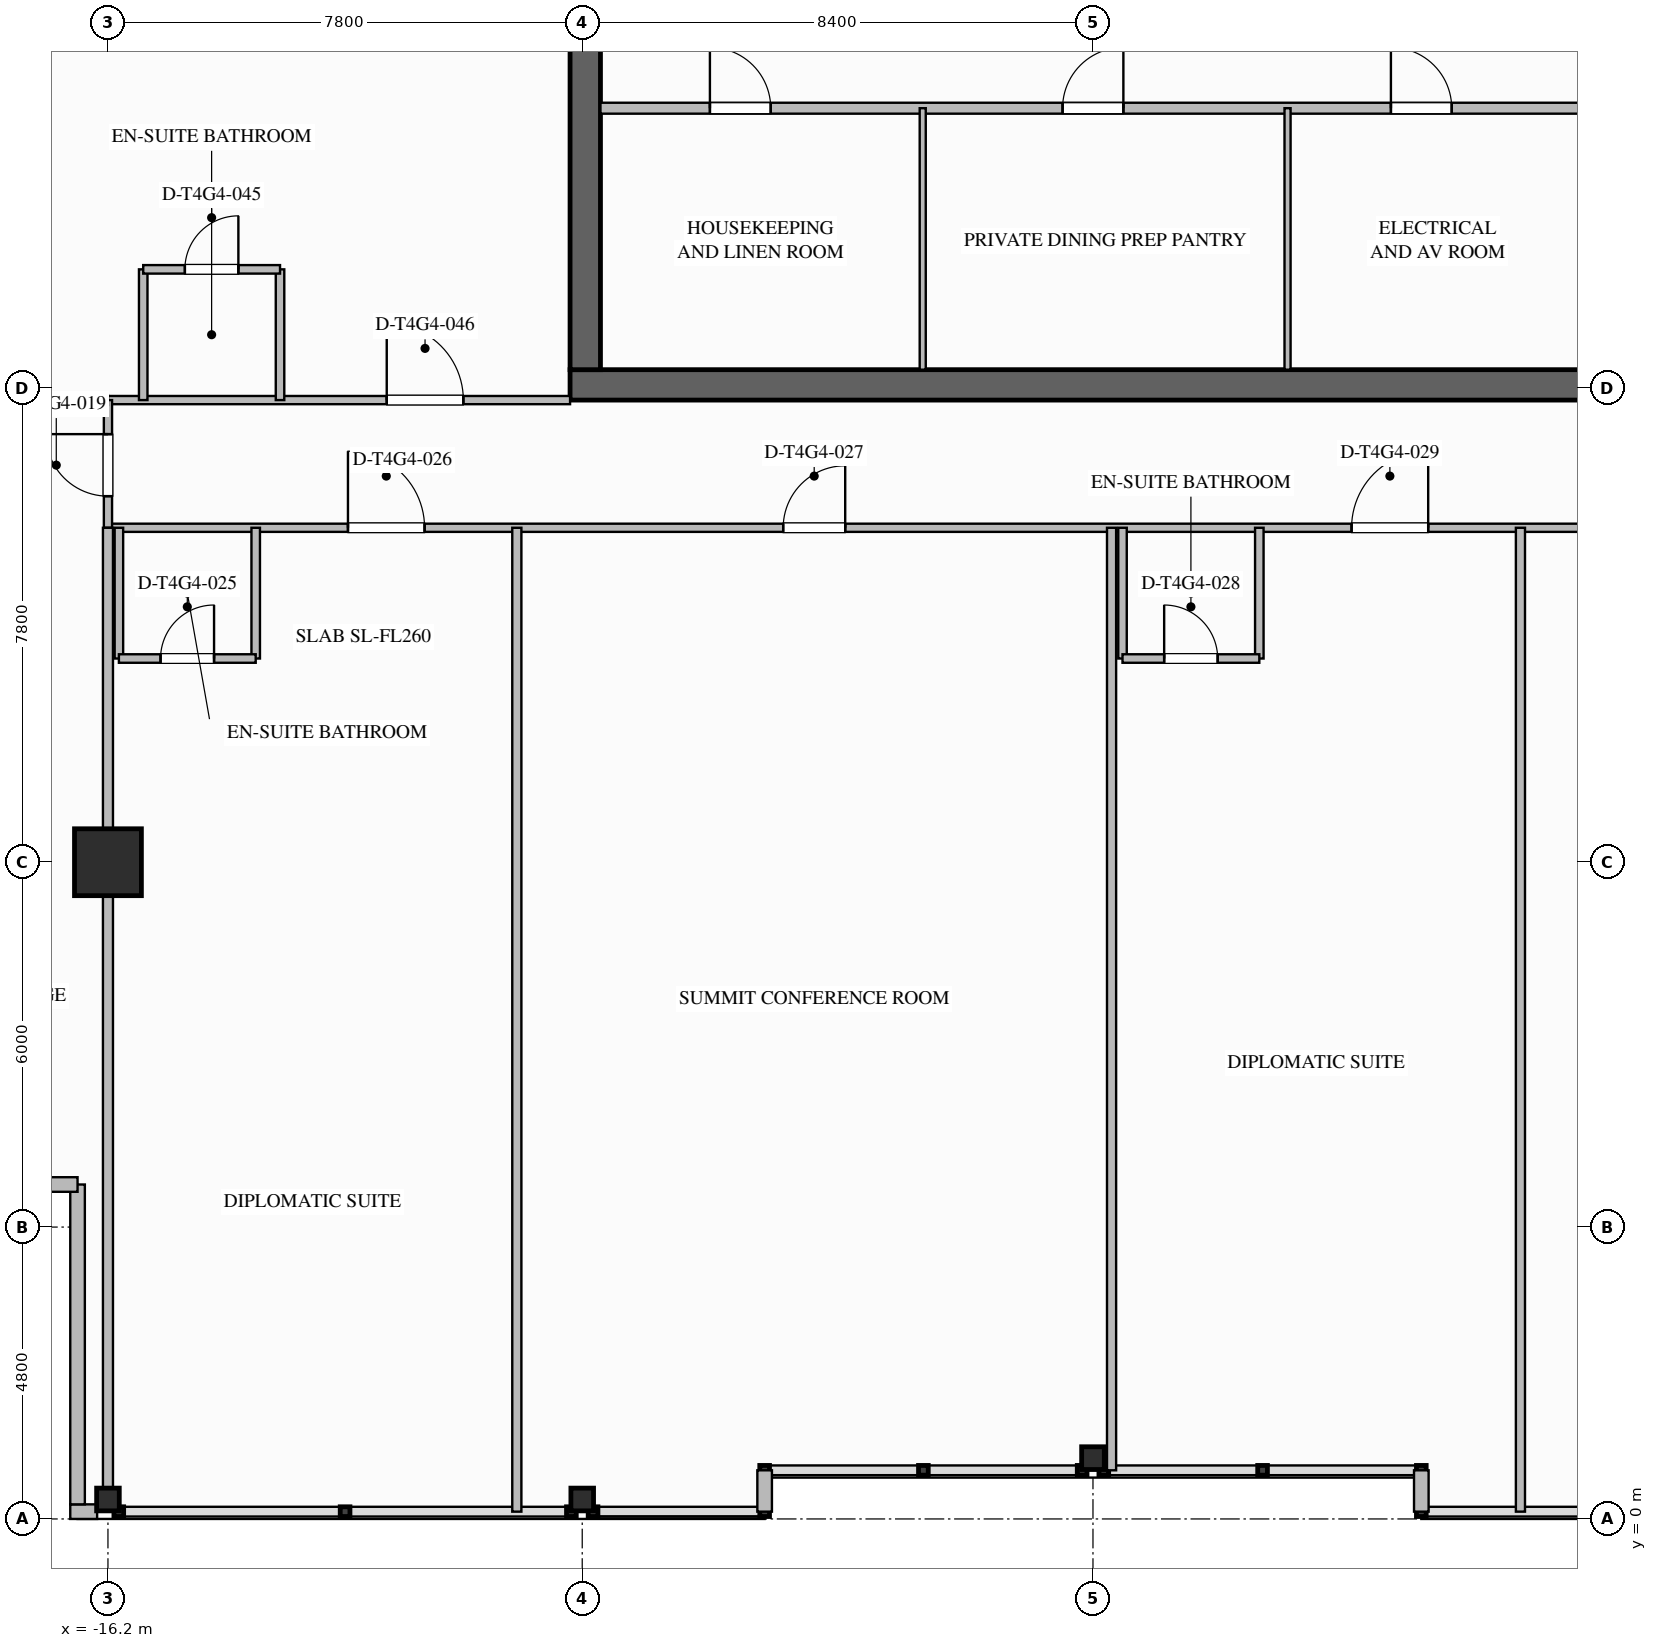
"""IFC4 building model, lengths in metres.
Left out: names, types, materials, properties, quantities, classifications, styles, units other than length and angle.
Written with IfcOpenShell. Run it as: python <this file> out.ifc"""

import sys

from ifc_helpers import new_model, si_unit, direction, frame, frame_2d, origin, origin_2d, place, context, subcontext, project, spatial, rectangle, i_section, extrude, element, fill, save


model = new_model("IFC4")
c1 = context("Model", 3, precision=1e-05, world=origin(), true_north=direction((0.0, 1.0)))
c2 = subcontext(c1, "Body", "Model", "MODEL_VIEW")
j1 = project(units=[si_unit("LENGTHUNIT", "METRE"), si_unit("PLANEANGLEUNIT", "RADIAN")], contexts=[c1])
p1 = place(None, origin())
s1 = spatial("IfcSite", under=j1, at=p1, CompositionType="ELEMENT")
p2 = place(p1, origin())
s2 = spatial("IfcBuilding", under=s1, at=p2, CompositionType="ELEMENT")
p3 = place(p2, frame((0.0, 0.0, 237.5)))
s3 = spatial("IfcBuildingStorey", under=s2, at=p3, CompositionType="ELEMENT", Elevation=237.5)
p4 = place(p3, frame((8.6, 18.65, 0.0), z_axis=(0.0, 0.0, 1.0), x_axis=(-1.0, 0.0, 0.0)))
e1 = element("IfcWall", 1, at=p4, inside=s3, PredefinedType="SHEAR", context=c2, shape_type="SweptSolid", body=[
    extrude(rectangle(XDim=17.2, YDim=0.5, at=frame_2d((8.6, 0.0))), origin(), (0.0, 0.0, 1.0), 3.6),
])
p5 = place(p3, frame((-8.35, 18.9, 0.0), z_axis=(0.0, 0.0, 1.0), x_axis=(0.0, 1.0, 0.0)))
e2 = element("IfcWall", 2, at=p5, inside=s3, PredefinedType="SHEAR", context=c2, shape_type="SweptSolid", body=[
    extrude(rectangle(XDim=16.2, YDim=0.5, at=frame_2d((8.1, 0.0))), origin(), (0.0, 0.0, 1.0), 3.6),
])
p6 = place(p3, frame((-16.2, 10.8, 0.0), z_axis=(0.0, 0.0, 1.0), x_axis=(1.0, 0.0, 0.0)))
e3 = element("IfcColumn", 3, at=p6, inside=s3, PredefinedType="COLUMN", context=c2, shape_type="SweptSolid", body=[
    extrude(rectangle(XDim=1.1, YDim=1.1, at=origin_2d()), origin(), (0.0, 0.0, 1.0), 3.6),
])
for number, where, z_axis, x_axis in (
    (4, (-16.2, 0.32, 0.0), (0.0, 0.0, 1.0), (0.0, 1.0, 0.0)),
    (5, (-8.4, 0.32, 0.0), (0.0, 0.0, 1.0), (0.0, 1.0, 0.0)),
    (6, (0.0, 1.0, 0.0), (0.0, 0.0, 1.0), (0.0, 1.0, 0.0)),
):
    element("IfcColumn", number, at=place(p3, frame(where, z_axis=z_axis, x_axis=x_axis)), inside=s3, PredefinedType="COLUMN", context=c2, shape_type="SweptSolid", body=[
        extrude(i_section(OverallWidth=0.374, OverallDepth=0.372, WebThickness=0.016, FlangeThickness=0.026, FilletRadius=0.025, at=origin_2d()), origin(), (0.0, 0.0, 1.0), 3.597),
    ])
p7 = place(p3, frame((-16.378, 0.12, 0.0), z_axis=(0.0, 0.0, 1.0), x_axis=(-1.0, 0.0, 0.0)))
e7 = element("IfcWall", 7, at=p7, inside=s3, PredefinedType="STANDARD", context=c2, shape_type="SweptSolid", body=[
    extrude(rectangle(XDim=0.442, YDim=0.24, at=frame_2d((0.221, 0.0))), origin(), (0.0, 0.0, 1.0), 3.34),
])
p8 = place(p3, frame((-16.7, 0.24, 0.0), z_axis=(0.0, 0.0, 1.0), x_axis=(0.0, 1.0, 0.0)))
e8 = element("IfcWall", 8, at=p8, inside=s3, PredefinedType="STANDARD", context=c2, shape_type="SweptSolid", body=[
    extrude(rectangle(XDim=5.26, YDim=0.24, at=frame_2d((2.63, 0.0))), origin(), (0.0, 0.0, 1.0), 3.34),
])
p9 = place(p3, frame((-16.7, 5.5, 0.0), z_axis=(0.0, 0.0, 1.0), x_axis=(-1.0, 0.0, 0.0)))
e9 = element("IfcWall", 9, at=p9, inside=s3, PredefinedType="STANDARD", context=c2, shape_type="SweptSolid", body=[
    extrude(rectangle(XDim=5.38, YDim=0.24, at=frame_2d((2.69, 0.0))), origin(), (0.0, 0.0, 1.0), 3.34),
])
for number, where, z_axis, x_axis in (
    (10, (5.4, 0.12, 0.0), (0.0, 0.0, 1.0), (0.0, 1.0, 0.0)),
    (11, (-5.4, 0.8, 0.0), (0.0, 0.0, 1.0), (0.0, -1.0, 0.0)),
):
    element("IfcWall", number, at=place(p3, frame(where, z_axis=z_axis, x_axis=x_axis)), inside=s3, PredefinedType="STANDARD", context=c2, shape_type="SweptSolid", body=[
        extrude(rectangle(XDim=0.68, YDim=0.24, at=frame_2d((0.34, 0.0))), origin(), (0.0, 0.0, 1.0), 3.34),
    ])
p10 = place(p3, frame((-8.1, 23.2, 0.0), z_axis=(0.0, 0.0, 1.0), x_axis=(1.0, 0.0, 0.0)))
e12 = element("IfcWall", 12, at=p10, inside=s3, PredefinedType="SOLIDWALL", context=c2, shape_type="SweptSolid", body=[
    extrude(rectangle(XDim=16.2, YDim=0.18, at=frame_2d((8.1, 0.0))), origin(), (0.0, 0.0, 1.0), 3.34),
])
p11 = place(p10, frame((1.8, 0.0, 0.0)))
e13 = element("IfcOpeningElement", 13, at=p11, cuts=e12, PredefinedType="OPENING", context=c2, shape_type="SweptSolid", body=[
    extrude(rectangle(XDim=1.0, YDim=2.1, at=frame_2d((0.5, 1.05))), frame((0.0, 0.1, 0.0), z_axis=(0.0, -1.0, 0.0), x_axis=(1.0, 0.0, 0.0)), (0.0, 0.0, 1.0), 0.2),
])
p12 = place(p10, frame((7.6, 0.0, 0.0)))
e14 = element("IfcOpeningElement", 14, at=p12, cuts=e12, PredefinedType="OPENING", context=c2, shape_type="SweptSolid", body=[
    extrude(rectangle(XDim=1.0, YDim=2.1, at=frame_2d((0.5, 1.05))), frame((0.0, 0.1, 0.0), z_axis=(0.0, -1.0, 0.0), x_axis=(1.0, 0.0, 0.0)), (0.0, 0.0, 1.0), 0.2),
])
p13 = place(p10, frame((13.0, 0.0, 0.0)))
e15 = element("IfcOpeningElement", 15, at=p13, cuts=e12, PredefinedType="OPENING", context=c2, shape_type="SweptSolid", body=[
    extrude(rectangle(XDim=1.0, YDim=2.1, at=frame_2d((0.5, 1.05))), frame((0.0, 0.1, 0.0), z_axis=(0.0, -1.0, 0.0), x_axis=(1.0, 0.0, 0.0)), (0.0, 0.0, 1.0), 0.2),
])
for number, where, z_axis, x_axis in (
    (16, (-2.8, 18.9, 0.0), (0.0, 0.0, 1.0), (0.0, 1.0, 0.0)),
    (17, (3.2, 18.9, 0.0), (0.0, 0.0, 1.0), (0.0, 1.0, 0.0)),
):
    element("IfcWall", number, at=place(p3, frame(where, z_axis=z_axis, x_axis=x_axis)), inside=s3, PredefinedType="PARTITIONING", context=c2, shape_type="SweptSolid", body=[
        extrude(rectangle(XDim=4.3, YDim=0.1, at=frame_2d((2.15, 0.0))), origin(), (0.0, 0.0, 1.0), 3.34),
    ])
p14 = place(p3, frame((-16.2, 16.3, 0.0), z_axis=(0.0, 0.0, 1.0), x_axis=(1.0, 0.0, 0.0)))
e18 = element("IfcWall", 18, at=p14, inside=s3, PredefinedType="PARTITIONING", context=c2, shape_type="SweptSolid", body=[
    extrude(rectangle(XDim=38.28, YDim=0.135, at=frame_2d((19.14, 0.0))), origin(), (0.0, 0.0, 1.0), 3.34),
])
p15 = place(p14, frame((35.785, 0.0, 0.0)))
e19 = element("IfcOpeningElement", 19, at=p15, cuts=e18, PredefinedType="OPENING", context=c2, shape_type="SweptSolid", body=[
    extrude(rectangle(XDim=1.26, YDim=2.2, at=frame_2d((0.63, 1.1))), frame((0.0, 0.077, 0.0), z_axis=(0.0, -1.0, 0.0), x_axis=(1.0, 0.0, 0.0)), (0.0, 0.0, 1.0), 0.155),
])
p16 = place(p14, frame((3.947, 0.0, 0.0)))
e20 = element("IfcOpeningElement", 20, at=p16, cuts=e18, PredefinedType="OPENING", context=c2, shape_type="SweptSolid", body=[
    extrude(rectangle(XDim=1.26, YDim=2.2, at=frame_2d((0.63, 1.1))), frame((0.0, 0.077, 0.0), z_axis=(0.0, -1.0, 0.0), x_axis=(1.0, 0.0, 0.0)), (0.0, 0.0, 1.0), 0.155),
])
p17 = place(p14, frame((11.105, 0.0, 0.0)))
e21 = element("IfcOpeningElement", 21, at=p17, cuts=e18, PredefinedType="OPENING", context=c2, shape_type="SweptSolid", body=[
    extrude(rectangle(XDim=1.02, YDim=2.15, at=frame_2d((0.51, 1.075))), frame((0.0, 0.077, 0.0), z_axis=(0.0, -1.0, 0.0), x_axis=(1.0, 0.0, 0.0)), (0.0, 0.0, 1.0), 0.155),
])
p18 = place(p14, frame((20.453, 0.0, 0.0)))
e22 = element("IfcOpeningElement", 22, at=p18, cuts=e18, PredefinedType="OPENING", context=c2, shape_type="SweptSolid", body=[
    extrude(rectangle(XDim=1.26, YDim=2.2, at=frame_2d((0.63, 1.1))), frame((0.0, 0.077, 0.0), z_axis=(0.0, -1.0, 0.0), x_axis=(1.0, 0.0, 0.0)), (0.0, 0.0, 1.0), 0.155),
])
p19 = place(p14, frame((25.97, 0.0, 0.0)))
e23 = element("IfcOpeningElement", 23, at=p19, cuts=e18, PredefinedType="OPENING", context=c2, shape_type="SweptSolid", body=[
    extrude(rectangle(XDim=1.26, YDim=2.2, at=frame_2d((0.63, 1.1))), frame((0.0, 0.077, 0.0), z_axis=(0.0, -1.0, 0.0), x_axis=(1.0, 0.0, 0.0)), (0.0, 0.0, 1.0), 0.155),
])
p20 = place(p3, frame((-16.2, 18.4, 0.0), z_axis=(0.0, 0.0, 1.0), x_axis=(1.0, 0.0, 0.0)))
e24 = element("IfcWall", 24, at=p20, inside=s3, PredefinedType="PARTITIONING", context=c2, shape_type="SweptSolid", body=[
    extrude(rectangle(XDim=7.6, YDim=0.135, at=frame_2d((3.8, 0.0))), origin(), (0.0, 0.0, 1.0), 2.717),
])
p21 = place(p20, frame((4.585, 0.0, 0.0)))
e25 = element("IfcOpeningElement", 25, at=p21, cuts=e24, PredefinedType="OPENING", context=c2, shape_type="SweptSolid", body=[
    extrude(rectangle(XDim=1.26, YDim=2.2, at=frame_2d((0.63, 1.1))), frame((0.0, 0.077, 0.0), z_axis=(0.0, -1.0, 0.0), x_axis=(1.0, 0.0, 0.0)), (0.0, 0.0, 1.0), 0.155),
])
p22 = place(p3, frame((-16.2, 16.3, 0.0), z_axis=(0.0, 0.0, 1.0), x_axis=(0.0, 1.0, 0.0)))
e26 = element("IfcWall", 26, at=p22, inside=s3, PredefinedType="PARTITIONING", context=c2, shape_type="SweptSolid", body=[
    extrude(rectangle(XDim=2.1, YDim=0.135, at=frame_2d((1.05, 0.0))), origin(), (0.0, 0.0, 1.0), 2.714),
])
p23 = place(p22, frame((0.52, 0.0, 0.0)))
e27 = element("IfcOpeningElement", 27, at=p23, cuts=e26, PredefinedType="OPENING", context=c2, shape_type="SweptSolid", body=[
    extrude(rectangle(XDim=1.02, YDim=2.15, at=frame_2d((0.51, 1.075))), frame((0.0, 0.077, 0.0), z_axis=(0.0, -1.0, 0.0), x_axis=(1.0, 0.0, 0.0)), (0.0, 0.0, 1.0), 0.155),
])
p24 = place(p3, frame((-16.2, 0.12, 0.0), z_axis=(0.0, 0.0, 1.0), x_axis=(0.0, 1.0, 0.0)))
e28 = element("IfcWall", 28, at=p24, inside=s3, PredefinedType="PARTITIONING", context=c2, shape_type="SweptSolid", body=[
    extrude(rectangle(XDim=16.18, YDim=0.165, at=frame_2d((8.09, 0.0))), origin(), (0.0, 0.0, 1.0), 2.714),
])
p25 = place(p3, frame((-22.08, 18.4, 0.0), z_axis=(0.0, 0.0, 1.0), x_axis=(1.0, 0.0, 0.0)))
e29 = element("IfcWall", 29, at=p25, inside=s3, PredefinedType="PARTITIONING", context=c2, shape_type="SweptSolid", body=[
    extrude(rectangle(XDim=5.88, YDim=0.165, at=frame_2d((2.94, 0.0))), origin(), (0.0, 0.0, 1.0), 2.714),
])
p26 = place(p3, frame((-16.02, 16.3, 0.0), z_axis=(0.0, 0.0, 1.0), x_axis=(0.0, -1.0, 0.0)))
e30 = element("IfcWall", 30, at=p26, inside=s3, PredefinedType="PLUMBINGWALL", context=c2, shape_type="SweptSolid", body=[
    extrude(rectangle(XDim=2.15, YDim=0.14, at=frame_2d((1.075, 0.0))), origin(), (0.0, 0.0, 1.0), 2.714),
])
p27 = place(p3, frame((-13.77, 16.3, 0.0), z_axis=(0.0, 0.0, 1.0), x_axis=(0.0, -1.0, 0.0)))
e31 = element("IfcWall", 31, at=p27, inside=s3, PredefinedType="PLUMBINGWALL", context=c2, shape_type="SweptSolid", body=[
    extrude(rectangle(XDim=2.15, YDim=0.14, at=frame_2d((1.075, 0.0))), origin(), (0.0, 0.0, 1.0), 3.34),
])
p28 = place(p3, frame((-16.02, 14.15, 0.0), z_axis=(0.0, 0.0, 1.0), x_axis=(1.0, 0.0, 0.0)))
e32 = element("IfcWall", 32, at=p28, inside=s3, PredefinedType="PLUMBINGWALL", context=c2, shape_type="SweptSolid", body=[
    extrude(rectangle(XDim=2.25, YDim=0.14, at=frame_2d((1.125, 0.0))), origin(), (0.0, 0.0, 1.0), 3.34),
])
p29 = place(p28, frame((0.685, 0.0, 0.0)))
e33 = element("IfcOpeningElement", 33, at=p29, cuts=e32, PredefinedType="OPENING", context=c2, shape_type="SweptSolid", body=[
    extrude(rectangle(XDim=0.88, YDim=2.1, at=frame_2d((0.44, 1.05))), frame((0.0, 0.08, 0.0), z_axis=(0.0, -1.0, 0.0), x_axis=(1.0, 0.0, 0.0)), (0.0, 0.0, 1.0), 0.16),
])
p30 = place(p3, frame((-9.476, 0.12, 0.0), z_axis=(0.0, 0.0, 1.0), x_axis=(0.0, 1.0, 0.0)))
e34 = element("IfcWall", 34, at=p30, inside=s3, PredefinedType="PARTITIONING", context=c2, shape_type="SweptSolid", body=[
    extrude(rectangle(XDim=16.18, YDim=0.15, at=frame_2d((8.09, 0.0))), origin(), (0.0, 0.0, 1.0), 3.34),
])
p31 = place(p3, frame((0.306, 0.8, 0.0), z_axis=(0.0, 0.0, 1.0), x_axis=(0.0, 1.0, 0.0)))
e35 = element("IfcWall", 35, at=p31, inside=s3, PredefinedType="PARTITIONING", context=c2, shape_type="SweptSolid", body=[
    extrude(rectangle(XDim=15.5, YDim=0.15, at=frame_2d((7.75, 0.0))), origin(), (0.0, 0.0, 1.0), 2.714),
])
for number, where, z_axis, x_axis in (
    (36, (0.486, 16.3, 0.0), (0.0, 0.0, 1.0), (0.0, -1.0, 0.0)),
    (37, (2.736, 16.3, 0.0), (0.0, 0.0, 1.0), (0.0, -1.0, 0.0)),
):
    element("IfcWall", number, at=place(p3, frame(where, z_axis=z_axis, x_axis=x_axis)), inside=s3, PredefinedType="PLUMBINGWALL", context=c2, shape_type="SweptSolid", body=[
        extrude(rectangle(XDim=2.15, YDim=0.14, at=frame_2d((1.075, 0.0))), origin(), (0.0, 0.0, 1.0), 3.34),
    ])
p32 = place(p3, frame((0.486, 14.15, 0.0), z_axis=(0.0, 0.0, 1.0), x_axis=(1.0, 0.0, 0.0)))
e38 = element("IfcWall", 38, at=p32, inside=s3, PredefinedType="PLUMBINGWALL", context=c2, shape_type="SweptSolid", body=[
    extrude(rectangle(XDim=2.25, YDim=0.14, at=frame_2d((1.125, 0.0))), origin(), (0.0, 0.0, 1.0), 3.34),
])
p33 = place(p32, frame((0.685, 0.0, 0.0)))
e39 = element("IfcOpeningElement", 39, at=p33, cuts=e38, PredefinedType="OPENING", context=c2, shape_type="SweptSolid", body=[
    extrude(rectangle(XDim=0.88, YDim=2.1, at=frame_2d((0.44, 1.05))), frame((0.0, 0.08, 0.0), z_axis=(0.0, -1.0, 0.0), x_axis=(1.0, 0.0, 0.0)), (0.0, 0.0, 1.0), 0.16),
])
p34 = place(p3, frame((7.03, 0.12, 0.0), z_axis=(0.0, 0.0, 1.0), x_axis=(0.0, 1.0, 0.0)))
e40 = element("IfcWall", 40, at=p34, inside=s3, PredefinedType="PARTITIONING", context=c2, shape_type="SweptSolid", body=[
    extrude(rectangle(XDim=16.18, YDim=0.15, at=frame_2d((8.09, 0.0))), origin(), (0.0, 0.0, 1.0), 3.34),
])
for number, where, z_axis, x_axis in (
    (41, (-15.62, 18.4, 0.0), (0.0, 0.0, 1.0), (0.0, 1.0, 0.0)),
    (42, (-13.37, 18.4, 0.0), (0.0, 0.0, 1.0), (0.0, 1.0, 0.0)),
):
    element("IfcWall", number, at=place(p3, frame(where, z_axis=z_axis, x_axis=x_axis)), inside=s3, PredefinedType="PLUMBINGWALL", context=c2, shape_type="SweptSolid", body=[
        extrude(rectangle(XDim=2.15, YDim=0.14, at=frame_2d((1.075, 0.0))), origin(), (0.0, 0.0, 1.0), 3.34),
    ])
p35 = place(p3, frame((-15.62, 20.55, 0.0), z_axis=(0.0, 0.0, 1.0), x_axis=(1.0, 0.0, 0.0)))
e43 = element("IfcWall", 43, at=p35, inside=s3, PredefinedType="PLUMBINGWALL", context=c2, shape_type="SweptSolid", body=[
    extrude(rectangle(XDim=2.25, YDim=0.14, at=frame_2d((1.125, 0.0))), origin(), (0.0, 0.0, 1.0), 3.34),
])
p36 = place(p35, frame((0.685, 0.0, 0.0)))
e44 = element("IfcOpeningElement", 44, at=p36, cuts=e43, PredefinedType="OPENING", context=c2, shape_type="SweptSolid", body=[
    extrude(rectangle(XDim=0.88, YDim=2.1, at=frame_2d((0.44, 1.05))), frame((0.0, 0.08, 0.0), z_axis=(0.0, -1.0, 0.0), x_axis=(1.0, 0.0, 0.0)), (0.0, 0.0, 1.0), 0.16),
])
p37 = place(p11, origin())
e45 = element("IfcDoor", 45, at=p37, inside=s3, OperationType="SINGLE_SWING_LEFT", PredefinedType="DOOR", context=c2, shape_type="SweptSolid", body=[
    extrude(rectangle(XDim=1.0, YDim=2.1, at=frame_2d((0.5, 1.05))), frame((0.0, 0.025, 0.0), z_axis=(0.0, -1.0, 0.0), x_axis=(1.0, 0.0, 0.0)), (0.0, 0.0, 1.0), 0.05),
])
fill(e13, e45)
p38 = place(p12, origin())
e46 = element("IfcDoor", 46, at=p38, inside=s3, OperationType="SINGLE_SWING_RIGHT", PredefinedType="DOOR", context=c2, shape_type="SweptSolid", body=[
    extrude(rectangle(XDim=1.0, YDim=2.1, at=frame_2d((0.5, 1.05))), frame((0.0, 0.025, 0.0), z_axis=(0.0, -1.0, 0.0), x_axis=(1.0, 0.0, 0.0)), (0.0, 0.0, 1.0), 0.05),
])
fill(e14, e46)
p39 = place(p13, origin())
e47 = element("IfcDoor", 47, at=p39, inside=s3, OperationType="SINGLE_SWING_LEFT", PredefinedType="DOOR", context=c2, shape_type="SweptSolid", body=[
    extrude(rectangle(XDim=1.0, YDim=2.1, at=frame_2d((0.5, 1.05))), frame((0.0, 0.025, 0.0), z_axis=(0.0, -1.0, 0.0), x_axis=(1.0, 0.0, 0.0)), (0.0, 0.0, 1.0), 0.05),
])
fill(e15, e47)
p40 = place(p23, origin())
e48 = element("IfcDoor", 48, at=p40, inside=s3, OperationType="SINGLE_SWING_RIGHT", PredefinedType="DOOR", context=c2, shape_type="SweptSolid", body=[
    extrude(rectangle(XDim=1.02, YDim=2.15, at=frame_2d((0.51, 1.075))), frame((0.0, 0.025, 0.0), z_axis=(0.0, -1.0, 0.0), x_axis=(1.0, 0.0, 0.0)), (0.0, 0.0, 1.0), 0.05),
])
fill(e27, e48)
p41 = place(p29, origin())
e49 = element("IfcDoor", 49, at=p41, inside=s3, OperationType="SINGLE_SWING_RIGHT", PredefinedType="DOOR", context=c2, shape_type="SweptSolid", body=[
    extrude(rectangle(XDim=0.88, YDim=2.1, at=frame_2d((0.44, 1.05))), frame((0.0, 0.025, 0.0), z_axis=(0.0, -1.0, 0.0), x_axis=(1.0, 0.0, 0.0)), (0.0, 0.0, 1.0), 0.05),
])
fill(e33, e49)
p42 = place(p16, origin())
e50 = element("IfcDoor", 50, at=p42, inside=s3, OperationType="SINGLE_SWING_LEFT", PredefinedType="DOOR", context=c2, shape_type="SweptSolid", body=[
    extrude(rectangle(XDim=1.26, YDim=2.2, at=frame_2d((0.63, 1.1))), frame((0.0, 0.025, 0.0), z_axis=(0.0, -1.0, 0.0), x_axis=(1.0, 0.0, 0.0)), (0.0, 0.0, 1.0), 0.05),
])
fill(e20, e50)
p43 = place(p17, origin())
e51 = element("IfcDoor", 51, at=p43, inside=s3, OperationType="SINGLE_SWING_RIGHT", PredefinedType="DOOR", context=c2, shape_type="SweptSolid", body=[
    extrude(rectangle(XDim=1.02, YDim=2.15, at=frame_2d((0.51, 1.075))), frame((0.0, 0.025, 0.0), z_axis=(0.0, -1.0, 0.0), x_axis=(1.0, 0.0, 0.0)), (0.0, 0.0, 1.0), 0.05),
])
fill(e21, e51)
p44 = place(p33, origin())
e52 = element("IfcDoor", 52, at=p44, inside=s3, OperationType="SINGLE_SWING_LEFT", PredefinedType="DOOR", context=c2, shape_type="SweptSolid", body=[
    extrude(rectangle(XDim=0.88, YDim=2.1, at=frame_2d((0.44, 1.05))), frame((0.0, 0.025, 0.0), z_axis=(0.0, -1.0, 0.0), x_axis=(1.0, 0.0, 0.0)), (0.0, 0.0, 1.0), 0.05),
])
fill(e39, e52)
p45 = place(p18, origin())
e53 = element("IfcDoor", 53, at=p45, inside=s3, OperationType="SINGLE_SWING_RIGHT", PredefinedType="DOOR", context=c2, shape_type="SweptSolid", body=[
    extrude(rectangle(XDim=1.26, YDim=2.2, at=frame_2d((0.63, 1.1))), frame((0.0, 0.025, 0.0), z_axis=(0.0, -1.0, 0.0), x_axis=(1.0, 0.0, 0.0)), (0.0, 0.0, 1.0), 0.05),
])
fill(e22, e53)
p46 = place(p36, origin())
e54 = element("IfcDoor", 54, at=p46, inside=s3, OperationType="SINGLE_SWING_RIGHT", PredefinedType="DOOR", context=c2, shape_type="SweptSolid", body=[
    extrude(rectangle(XDim=0.88, YDim=2.1, at=frame_2d((0.44, 1.05))), frame((0.0, 0.025, 0.0), z_axis=(0.0, -1.0, 0.0), x_axis=(1.0, 0.0, 0.0)), (0.0, 0.0, 1.0), 0.05),
])
fill(e44, e54)
p47 = place(p21, origin())
e55 = element("IfcDoor", 55, at=p47, inside=s3, OperationType="SINGLE_SWING_LEFT", PredefinedType="DOOR", context=c2, shape_type="SweptSolid", body=[
    extrude(rectangle(XDim=1.26, YDim=2.2, at=frame_2d((0.63, 1.1))), frame((0.0, 0.025, 0.0), z_axis=(0.0, -1.0, 0.0), x_axis=(1.0, 0.0, 0.0)), (0.0, 0.0, 1.0), 0.05),
])
fill(e25, e55)
save(model, sys.argv[1])
